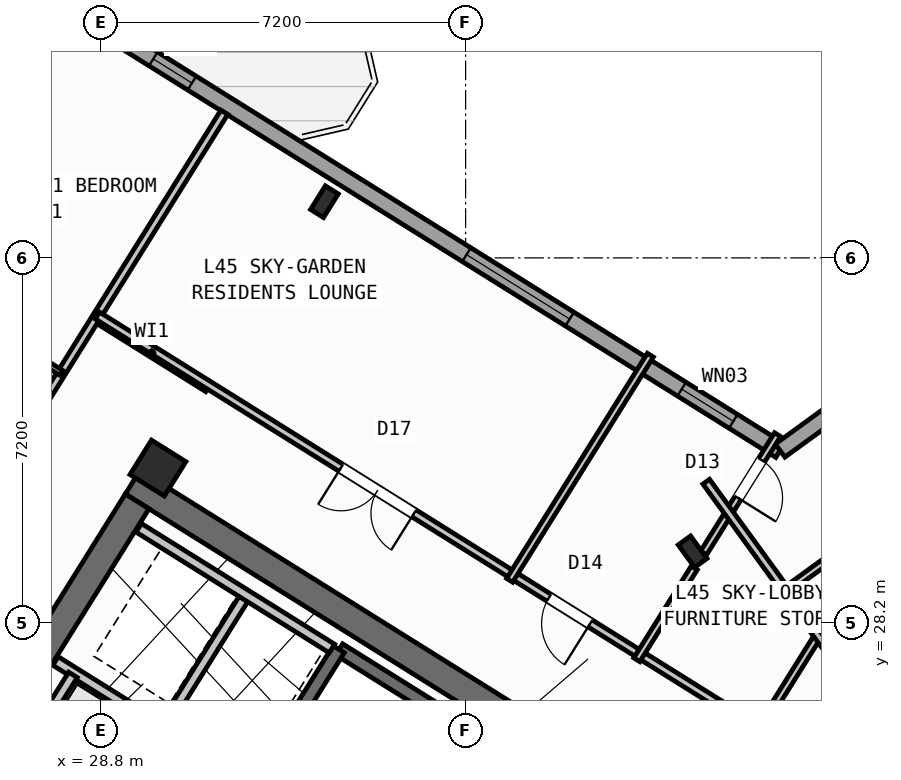
"""IFC4 building model, lengths in metres.
Left out: names, types, materials, properties, quantities, classifications, styles, units other than length and angle.
Written with IfcOpenShell. Run it as: python <this file> out.ifc"""

import sys

from ifc_helpers import new_model, si_unit, direction, frame, frame_2d, origin, origin_2d, place, context, subcontext, project, spatial, rectangle, hollow_rectangle, i_section, extrude, source, transform, mapped, element, fill, save


model = new_model("IFC4")
c1 = context("Model", 3, precision=1e-05, world=origin(), true_north=direction((0.0, 1.0)))
c2 = subcontext(c1, "Body", "Model", "MODEL_VIEW")
j1 = project(units=[si_unit("LENGTHUNIT", "METRE"), si_unit("PLANEANGLEUNIT", "RADIAN")], contexts=[c1])
p1 = place(None, origin())
s1 = spatial("IfcSite", under=j1, at=p1, CompositionType="ELEMENT")
p2 = place(p1, origin())
s2 = spatial("IfcBuilding", under=s1, at=p2, CompositionType="ELEMENT")
p3 = place(p2, frame((0.0, 0.0, 179.4)))
s3 = spatial("IfcBuildingStorey", under=s2, at=p3, CompositionType="ELEMENT", Elevation=179.4)
p4 = place(p3, frame((40.573, 24.01, 0.0), z_axis=(0.0, 0.0, 1.0), x_axis=(-0.848047359947, 0.529920442413, 0.0)))
e1 = element("IfcWall", 1, at=p4, inside=s3, PredefinedType="SHEAR", context=c2, shape_type="SweptSolid", body=[
    extrude(rectangle(XDim=13.14, YDim=0.55, at=frame_2d((6.57, 0.0))), origin(), (0.0, 0.0, 1.0), 4.55),
])
p5 = place(p3, frame((29.517, 30.594, 0.0), z_axis=(0.0, 0.0, 1.0), x_axis=(-0.529906864564, -0.848055844204, 0.0)))
e2 = element("IfcWall", 2, at=p5, inside=s3, PredefinedType="SHEAR", context=c2, shape_type="SweptSolid", body=[
    extrude(rectangle(XDim=3.575, YDim=0.55, at=frame_2d((1.788, 0.0))), origin(), (0.0, 0.0, 1.0), 4.55),
])
m1 = source(origin(), c2, "Body", "SweptSolid", [
    extrude(i_section(OverallWidth=0.3, OverallDepth=0.55, WebThickness=0.015, FlangeThickness=0.029, at=origin_2d()), origin(), (0.0, 0.0, 1.0), 4.8),
])
p6 = place(p3, frame((33.213, 36.509, 0.0), z_axis=(0.0, 0.0, 1.0), x_axis=(-0.848048096156, 0.529919264233, 0.0)))
e3 = element("IfcColumn", 3, at=p6, inside=s3, PredefinedType="COLUMN", context=c2, shape_type="MappedRepresentation", body=[
    mapped(m1, transform((0.0, 0.0, 0.0), scale=1.0)),
])
m2 = source(origin(), c2, "Body", "SweptSolid", [
    extrude(hollow_rectangle(XDim=0.8, YDim=0.8, WallThickness=0.032, at=origin_2d()), origin(), (0.0, 0.0, 1.0), 4.8),
])
p7 = place(p3, frame((29.928, 31.251, 0.0), z_axis=(0.0, 0.0, 1.0), x_axis=(-0.848048096156, 0.529919264233, 0.0)))
e4 = element("IfcColumn", 4, at=p7, inside=s3, PredefinedType="COLUMN", context=c2, shape_type="MappedRepresentation", body=[
    mapped(m2, transform((0.0, 0.0, 0.0), scale=1.0)),
])
p8 = place(p3, frame((40.479, 29.601, 0.0), z_axis=(0.0, 0.0, 1.0), x_axis=(0.809016994375, 0.587785252292, 0.0)))
e5 = element("IfcColumn", 5, at=p8, inside=s3, PredefinedType="COLUMN", context=c2, shape_type="MappedRepresentation", body=[
    mapped(m1, transform((0.0, 0.0, 0.0), scale=1.0)),
])
p9 = place(p3, frame((31.76, 12.183, 0.0), z_axis=(0.0, 0.0, 1.0), x_axis=(-0.848047074256, 0.529920899612, 0.0)))
e6 = element("IfcWall", 6, at=p9, inside=s3, PredefinedType="STANDARD", context=c2, shape_type="SweptSolid", body=[
    extrude(rectangle(XDim=30.652, YDim=0.32, at=frame_2d((15.326, 0.0))), origin(), (0.0, 0.0, 1.0), 4.55),
])
p10 = place(p9, frame((21.52, 0.0, 0.0)))
e7 = element("IfcOpeningElement", 7, at=p10, cuts=e6, PredefinedType="OPENING", context=c2, shape_type="SweptSolid", body=[
    extrude(rectangle(XDim=1.2, YDim=2.15, at=frame_2d((0.6, 1.075))), frame((0.0, 0.17, 0.0), z_axis=(0.0, -1.0, 0.0), x_axis=(1.0, 0.0, 0.0)), (0.0, 0.0, 1.0), 0.34),
])
p11 = place(p9, frame((14.878, 0.0, 0.0)))
e8 = element("IfcOpeningElement", 8, at=p11, cuts=e6, PredefinedType="OPENING", context=c2, shape_type="SweptSolid", body=[
    extrude(rectangle(XDim=1.5, YDim=2.25, at=frame_2d((0.75, 1.125))), frame((0.0, 0.17, 0.0), z_axis=(0.0, -1.0, 0.0), x_axis=(1.0, 0.0, 0.0)), (0.0, 0.0, 1.0), 0.34),
])
p12 = place(p9, frame((1.865, 0.0, 0.75)))
e9 = element("IfcOpeningElement", 9, at=p12, cuts=e6, PredefinedType="OPENING", context=c2, shape_type="SweptSolid", body=[
    extrude(rectangle(XDim=2.4, YDim=1.6, at=frame_2d((1.2, 0.8))), frame((0.0, 0.17, 0.0), z_axis=(0.0, -1.0, 0.0), x_axis=(1.0, 0.0, 0.0)), (0.0, 0.0, 1.0), 0.34),
])
p13 = place(p9, frame((7.094, 0.0, 0.75)))
e10 = element("IfcOpeningElement", 10, at=p13, cuts=e6, PredefinedType="OPENING", context=c2, shape_type="SweptSolid", body=[
    extrude(rectangle(XDim=2.4, YDim=1.6, at=frame_2d((1.2, 0.8))), frame((0.0, 0.17, 0.0), z_axis=(0.0, -1.0, 0.0), x_axis=(1.0, 0.0, 0.0)), (0.0, 0.0, 1.0), 0.34),
])
p14 = place(p9, frame((19.404, 0.0, 0.95)))
e11 = element("IfcOpeningElement", 11, at=p14, cuts=e6, PredefinedType="OPENING", context=c2, shape_type="SweptSolid", body=[
    extrude(rectangle(XDim=1.2, YDim=1.4, at=frame_2d((0.6, 0.7))), frame((0.0, 0.17, 0.0), z_axis=(0.0, -1.0, 0.0), x_axis=(1.0, 0.0, 0.0)), (0.0, 0.0, 1.0), 0.34),
])
p15 = place(p9, frame((26.458, 0.0, 0.75)))
e12 = element("IfcOpeningElement", 12, at=p15, cuts=e6, PredefinedType="OPENING", context=c2, shape_type="SweptSolid", body=[
    extrude(rectangle(XDim=2.4, YDim=1.6, at=frame_2d((1.2, 0.8))), frame((0.0, 0.17, 0.0), z_axis=(0.0, -1.0, 0.0), x_axis=(1.0, 0.0, 0.0)), (0.0, 0.0, 1.0), 0.34),
])
p16 = place(p3, frame((17.424, 47.083, 0.0), z_axis=(0.0, 0.0, 1.0), x_axis=(0.848049927979, -0.529916332693, 0.0)))
e13 = element("IfcWall", 13, at=p16, inside=s3, PredefinedType="STANDARD", context=c2, shape_type="SweptSolid", body=[
    extrude(rectangle(XDim=29.223, YDim=0.32, at=frame_2d((14.612, 0.0))), origin(), (0.0, 0.0, 1.0), 4.55),
])
p17 = place(p16, frame((2.745, 0.0, 0.0)))
e14 = element("IfcOpeningElement", 14, at=p17, cuts=e13, PredefinedType="OPENING", context=c2, shape_type="SweptSolid", body=[
    extrude(rectangle(XDim=1.05, YDim=2.15, at=frame_2d((0.525, 1.075))), frame((0.0, 0.17, 0.0), z_axis=(0.0, -1.0, 0.0), x_axis=(1.0, 0.0, 0.0)), (0.0, 0.0, 1.0), 0.34),
])
p18 = place(p16, frame((21.926, 0.0, 0.75)))
e15 = element("IfcOpeningElement", 15, at=p18, cuts=e13, PredefinedType="OPENING", context=c2, shape_type="SweptSolid", body=[
    extrude(rectangle(XDim=2.4, YDim=1.6, at=frame_2d((1.2, 0.8))), frame((0.0, 0.17, 0.0), z_axis=(0.0, -1.0, 0.0), x_axis=(1.0, 0.0, 0.0)), (0.0, 0.0, 1.0), 0.34),
])
p19 = place(p16, frame((26.934, 0.0, 0.95)))
e16 = element("IfcOpeningElement", 16, at=p19, cuts=e13, PredefinedType="OPENING", context=c2, shape_type="SweptSolid", body=[
    extrude(rectangle(XDim=1.2, YDim=1.4, at=frame_2d((0.6, 0.7))), frame((0.0, 0.17, 0.0), z_axis=(0.0, -1.0, 0.0), x_axis=(1.0, 0.0, 0.0)), (0.0, 0.0, 1.0), 0.34),
])
p20 = place(p16, frame((10.057, 0.0, 1.0)))
e17 = element("IfcOpeningElement", 17, at=p20, cuts=e13, PredefinedType="OPENING", context=c2, shape_type="SweptSolid", body=[
    extrude(rectangle(XDim=0.65, YDim=1.15, at=frame_2d((0.325, 0.575))), frame((0.0, 0.17, 0.0), z_axis=(0.0, -1.0, 0.0), x_axis=(1.0, 0.0, 0.0)), (0.0, 0.0, 1.0), 0.34),
])
p21 = place(p16, frame((14.636, 0.0, 1.0)))
e18 = element("IfcOpeningElement", 18, at=p21, cuts=e13, PredefinedType="OPENING", context=c2, shape_type="SweptSolid", body=[
    extrude(rectangle(XDim=0.9, YDim=1.25, at=frame_2d((0.45, 0.625))), frame((0.0, 0.17, 0.0), z_axis=(0.0, -1.0, 0.0), x_axis=(1.0, 0.0, 0.0)), (0.0, 0.0, 1.0), 0.34),
])
p22 = place(p16, frame((8.052, 0.0, 1.0)))
e19 = element("IfcOpeningElement", 19, at=p22, cuts=e13, PredefinedType="OPENING", context=c2, shape_type="SweptSolid", body=[
    extrude(rectangle(XDim=0.65, YDim=1.15, at=frame_2d((0.325, 0.575))), frame((0.0, 0.17, 0.0), z_axis=(0.0, -1.0, 0.0), x_axis=(1.0, 0.0, 0.0)), (0.0, 0.0, 1.0), 0.34),
])
p23 = place(p3, frame((42.207, 31.597, 0.0), z_axis=(0.0, 0.0, 1.0), x_axis=(0.809020333377, 0.587780656523, 0.0)))
e20 = element("IfcWall", 20, at=p23, inside=s3, PredefinedType="STANDARD", context=c2, shape_type="SweptSolid", body=[
    extrude(rectangle(XDim=15.223, YDim=0.32, at=frame_2d((7.611, 0.0))), origin(), (0.0, 0.0, 1.0), 4.55),
])
p24 = place(p23, frame((12.562, 0.0, 0.0)))
e21 = element("IfcOpeningElement", 21, at=p24, cuts=e20, PredefinedType="OPENING", context=c2, shape_type="SweptSolid", body=[
    extrude(rectangle(XDim=1.05, YDim=2.15, at=frame_2d((0.525, 1.075))), frame((0.0, 0.17, 0.0), z_axis=(0.0, -1.0, 0.0), x_axis=(1.0, 0.0, 0.0)), (0.0, 0.0, 1.0), 0.34),
])
p25 = place(p23, frame((2.97, 0.0, 0.75)))
e22 = element("IfcOpeningElement", 22, at=p25, cuts=e20, PredefinedType="OPENING", context=c2, shape_type="SweptSolid", body=[
    extrude(rectangle(XDim=2.4, YDim=1.6, at=frame_2d((1.2, 0.8))), frame((0.0, 0.17, 0.0), z_axis=(0.0, -1.0, 0.0), x_axis=(1.0, 0.0, 0.0)), (0.0, 0.0, 1.0), 0.34),
])
p26 = place(p3, frame((39.721, 23.788, 0.0), z_axis=(0.0, 0.0, 1.0), x_axis=(-0.848054434086, 0.529909121291, 0.0)))
e23 = element("IfcWall", 23, at=p26, inside=s3, PredefinedType="SHEAR", context=c2, shape_type="SweptSolid", body=[
    extrude(rectangle(XDim=7.33, YDim=0.26, at=frame_2d((3.665, 0.0))), origin(), (0.0, 0.0, 1.0), 4.55),
])
p27 = place(p3, frame((33.496, 27.677, 0.0), z_axis=(0.0, 0.0, 1.0), x_axis=(-0.529908658664, -0.84805472316, 0.0)))
e24 = element("IfcWall", 24, at=p27, inside=s3, PredefinedType="SHEAR", context=c2, shape_type="SweptSolid", body=[
    extrude(rectangle(XDim=3.16, YDim=0.26, at=frame_2d((1.58, 0.0))), origin(), (0.0, 0.0, 1.0), 4.55),
])
p28 = place(p3, frame((31.822, 24.998, 0.0), z_axis=(0.0, 0.0, 1.0), x_axis=(-0.848036912365, 0.52993716162, 0.0)))
e25 = element("IfcWall", 25, at=p28, inside=s3, PredefinedType="STANDARD", context=c2, shape_type="SweptSolid", body=[
    extrude(rectangle(XDim=4.618, YDim=0.2, at=frame_2d((2.309, 0.0))), origin(), (0.0, 0.0, 1.0), 4.54),
])
p29 = place(p3, frame((28.25, 27.17, 0.0), z_axis=(0.0, 0.0, 1.0), x_axis=(-0.529905827651, -0.848056492117, 0.0)))
e26 = element("IfcWall", 26, at=p29, inside=s3, PredefinedType="STANDARD", context=c2, shape_type="SweptSolid", body=[
    extrude(rectangle(XDim=1.65, YDim=0.2, at=frame_2d((0.825, 0.0))), origin(), (0.0, 0.0, 1.0), 4.54),
])
p30 = place(p3, frame((31.645, 28.716, 0.0), z_axis=(0.0, 0.0, 1.0), x_axis=(-0.52986693015, -0.848080795876, 0.0)))
e27 = element("IfcWall", 27, at=p30, inside=s3, PredefinedType="STANDARD", context=c2, shape_type="SweptSolid", body=[
    extrude(rectangle(XDim=2.66, YDim=0.2, at=frame_2d((1.33, 0.0))), origin(), (0.0, 0.0, 1.0), 4.54),
])
p31 = place(p3, frame((33.363, 27.69, 0.0), z_axis=(0.0, 0.0, 1.0), x_axis=(-0.848047090064, 0.529920874315, 0.0)))
e28 = element("IfcWall", 28, at=p31, inside=s3, PredefinedType="STANDARD", context=c2, shape_type="SweptSolid", body=[
    extrude(rectangle(XDim=4.498, YDim=0.2, at=frame_2d((2.249, 0.0))), origin(), (0.0, 0.0, 1.0), 4.54),
])
p32 = place(p3, frame((30.914, 32.829, 0.0), z_axis=(0.0, 0.0, 1.0), x_axis=(-0.848008813643, 0.529982124211, 0.0)))
e29 = element("IfcWall", 29, at=p32, inside=s3, PredefinedType="PARTITIONING", context=c2, shape_type="SweptSolid", body=[
    extrude(rectangle(XDim=2.61, YDim=0.16, at=frame_2d((1.305, 0.0))), origin(), (0.0, 0.0, 1.0), 4.54),
])
p33 = place(p3, frame((31.239, 38.274, 0.0), z_axis=(0.0, 0.0, 1.0), x_axis=(-0.529921796515, -0.848046513806, 0.0)))
e30 = element("IfcWall", 30, at=p33, inside=s3, PredefinedType="PARTITIONING", context=c2, shape_type="SweptSolid", body=[
    extrude(rectangle(XDim=16.5, YDim=0.16, at=frame_2d((8.25, 0.0))), origin(), (0.0, 0.0, 1.0), 4.54),
])
p34 = place(p3, frame((27.889, 40.685, 0.0), z_axis=(0.0, 0.0, 1.0), x_axis=(-0.529924752708, -0.848044666552, 0.0)))
e31 = element("IfcWall", 31, at=p34, inside=s3, PredefinedType="PARTITIONING", context=c2, shape_type="SweptSolid", body=[
    extrude(rectangle(XDim=6.508, YDim=0.11, at=frame_2d((3.254, 0.0))), origin(), (0.0, 0.0, 1.0), 4.54),
])
p35 = place(p3, frame((28.023, 33.129, 0.0), z_axis=(0.0, 0.0, 1.0), x_axis=(-0.848051592054, 0.529913669587, 0.0)))
e32 = element("IfcWall", 32, at=p35, inside=s3, PredefinedType="PARTITIONING", context=c2, shape_type="SweptSolid", body=[
    extrude(rectangle(XDim=4.118, YDim=0.11, at=frame_2d((2.059, 0.0))), origin(), (0.0, 0.0, 1.0), 4.54),
])
p36 = place(p35, frame((1.599, 0.0, 0.0)))
e33 = element("IfcOpeningElement", 33, at=p36, cuts=e32, PredefinedType="OPENING", context=c2, shape_type="SweptSolid", body=[
    extrude(rectangle(XDim=0.92, YDim=2.08, at=frame_2d((0.46, 1.04))), frame((0.0, 0.065, 0.0), z_axis=(0.0, -1.0, 0.0), x_axis=(1.0, 0.0, 0.0)), (0.0, 0.0, 1.0), 0.13),
])
p37 = place(p3, frame((41.936, 26.012, 0.0), z_axis=(0.0, 0.0, 1.0), x_axis=(-0.848051154596, 0.529914369676, 0.0)))
e34 = element("IfcWall", 34, at=p37, inside=s3, PredefinedType="PARTITIONING", context=c2, shape_type="SweptSolid", body=[
    extrude(rectangle(XDim=15.57, YDim=0.16, at=frame_2d((7.785, 0.0))), origin(), (0.0, 0.0, 1.0), 4.54),
])
p38 = place(p37, frame((4.1, 0.0, 0.0)))
e35 = element("IfcOpeningElement", 35, at=p38, cuts=e34, PredefinedType="OPENING", context=c2, shape_type="SweptSolid", body=[
    extrude(rectangle(XDim=0.96, YDim=2.08, at=frame_2d((0.48, 1.04))), frame((0.0, 0.09, 0.0), z_axis=(0.0, -1.0, 0.0), x_axis=(1.0, 0.0, 0.0)), (0.0, 0.0, 1.0), 0.18),
])
p39 = place(p37, frame((8.2, 0.0, 0.0)))
e36 = element("IfcOpeningElement", 36, at=p39, cuts=e34, PredefinedType="OPENING", context=c2, shape_type="SweptSolid", body=[
    extrude(rectangle(XDim=1.7, YDim=2.2, at=frame_2d((0.85, 1.1))), frame((0.0, 0.09, 0.0), z_axis=(0.0, -1.0, 0.0), x_axis=(1.0, 0.0, 0.0)), (0.0, 0.0, 1.0), 0.18),
])
p40 = place(p3, frame((42.156, 31.912, 0.0), z_axis=(0.0, 0.0, 1.0), x_axis=(-0.529943141103, -0.848033175765, 0.0)))
e37 = element("IfcWall", 37, at=p40, inside=s3, PredefinedType="PLUMBINGWALL", context=c2, shape_type="SweptSolid", body=[
    extrude(rectangle(XDim=2.753, YDim=0.14, at=frame_2d((1.376, 0.0))), origin(), (0.0, 0.0, 1.0), 4.135),
])
p41 = place(p40, frame((0.593, 0.0, 0.0)))
e38 = element("IfcOpeningElement", 38, at=p41, cuts=e37, PredefinedType="OPENING", context=c2, shape_type="SweptSolid", body=[
    extrude(rectangle(XDim=0.88, YDim=2.08, at=frame_2d((0.44, 1.04))), frame((0.0, 0.08, 0.0), z_axis=(0.0, -1.0, 0.0), x_axis=(1.0, 0.0, 0.0)), (0.0, 0.0, 1.0), 0.16),
])
p42 = place(p3, frame((40.512, 29.281, 0.0), z_axis=(0.0, 0.0, 1.0), x_axis=(-0.529947607416, -0.848030384712, 0.0)))
e39 = element("IfcWall", 39, at=p42, inside=s3, PredefinedType="PLUMBINGWALL", context=c2, shape_type="SweptSolid", body=[
    extrude(rectangle(XDim=2.138, YDim=0.14, at=frame_2d((1.069, 0.0))), origin(), (0.0, 0.0, 1.0), 4.54),
])
p43 = place(p3, frame((43.916, 29.483, 0.0), z_axis=(0.0, 0.0, 1.0), x_axis=(-0.529897559092, -0.848061658648, 0.0)))
e40 = element("IfcWall", 40, at=p43, inside=s3, PredefinedType="PLUMBINGWALL", context=c2, shape_type="SweptSolid", body=[
    extrude(rectangle(XDim=4.113, YDim=0.14, at=frame_2d((2.057, 0.0))), origin(), (0.0, 0.0, 1.0), 4.025),
])
p44 = place(p3, frame((39.646, 33.48, 0.0), z_axis=(0.0, 0.0, 1.0), x_axis=(-0.529923555071, -0.848045414928, 0.0)))
e41 = element("IfcWall", 41, at=p44, inside=s3, PredefinedType="PLUMBINGWALL", context=c2, shape_type="SweptSolid", body=[
    extrude(rectangle(XDim=5.24, YDim=0.14, at=frame_2d((2.62, 0.0))), origin(), (0.0, 0.0, 1.0), 4.54),
])
p45 = place(p3, frame((42.866, 26.044, 0.0), z_axis=(0.0, 0.0, 1.0), x_axis=(0.809020254154, 0.587780765566, 0.0)))
e42 = element("IfcWall", 42, at=p45, inside=s3, PredefinedType="PARTITIONING", context=c2, shape_type="SweptSolid", body=[
    extrude(rectangle(XDim=14.67, YDim=0.16, at=frame_2d((7.335, 0.0))), origin(), (0.0, 0.0, 1.0), 4.54),
])
p46 = place(p45, frame((10.08, 0.0, 0.0)))
e43 = element("IfcOpeningElement", 43, at=p46, cuts=e42, PredefinedType="OPENING", context=c2, shape_type="SweptSolid", body=[
    extrude(rectangle(XDim=1.0, YDim=2.1, at=frame_2d((0.5, 1.05))), frame((0.0, 0.09, 0.0), z_axis=(0.0, -1.0, 0.0), x_axis=(1.0, 0.0, 0.0)), (0.0, 0.0, 1.0), 0.18),
])
p47 = place(p3, frame((43.969, 26.55, 0.0), z_axis=(0.0, 0.0, 1.0), x_axis=(-0.587776919386, 0.80902304852, 0.0)))
e44 = element("IfcWall", 44, at=p47, inside=s3, PredefinedType="PARTITIONING", context=c2, shape_type="SweptSolid", body=[
    extrude(rectangle(XDim=5.48, YDim=0.16, at=frame_2d((2.74, 0.0))), origin(), (0.0, 0.0, 1.0), 4.54),
])
p48 = place(p3, frame((42.377, 28.878, 0.0), z_axis=(0.0, 0.0, 1.0), x_axis=(0.809020411523, 0.587780548963, 0.0)))
e45 = element("IfcWall", 45, at=p48, inside=s3, PredefinedType="PLUMBINGWALL", context=c2, shape_type="SweptSolid", body=[
    extrude(rectangle(XDim=13.4, YDim=0.14, at=frame_2d((6.7, 0.0))), origin(), (0.0, 0.0, 1.0), 4.54),
])
p49 = place(p48, frame((8.82, 0.0, 0.0)))
e46 = element("IfcOpeningElement", 46, at=p49, cuts=e45, PredefinedType="OPENING", context=c2, shape_type="SweptSolid", body=[
    extrude(rectangle(XDim=0.92, YDim=2.08, at=frame_2d((0.46, 1.04))), frame((0.0, 0.08, 0.0), z_axis=(0.0, -1.0, 0.0), x_axis=(1.0, 0.0, 0.0)), (0.0, 0.0, 1.0), 0.16),
])
m3 = source(origin(), c2, "Body", "SweptSolid", [
    extrude(rectangle(XDim=2.4, YDim=1.6, at=frame_2d((1.2, 0.8))), frame((0.0, 0.03, 0.0), z_axis=(0.0, -1.0, 0.0), x_axis=(1.0, 0.0, 0.0)), (0.0, 0.0, 1.0), 0.06),
])
p50 = place(p18, origin())
e47 = element("IfcWindow", 47, at=p50, inside=s3, PartitioningType="SINGLE_PANEL", PredefinedType="WINDOW", context=c2, shape_type="MappedRepresentation", body=[
    mapped(m3, transform((0.0, 0.0, 0.0), scale=1.0)),
])
fill(e15, e47)
m4 = source(origin(), c2, "Body", "SweptSolid", [
    extrude(rectangle(XDim=1.2, YDim=1.4, at=frame_2d((0.6, 0.7))), frame((0.0, 0.03, 0.0), z_axis=(0.0, -1.0, 0.0), x_axis=(1.0, 0.0, 0.0)), (0.0, 0.0, 1.0), 0.06),
])
p51 = place(p19, origin())
e48 = element("IfcWindow", 48, at=p51, inside=s3, PartitioningType="SINGLE_PANEL", PredefinedType="WINDOW", context=c2, shape_type="MappedRepresentation", body=[
    mapped(m4, transform((0.0, 0.0, 0.0), scale=1.0)),
])
fill(e16, e48)
m5 = source(origin(), c2, "Body", "SweptSolid", [
    extrude(rectangle(XDim=0.9, YDim=1.25, at=frame_2d((0.45, 0.625))), frame((0.0, 0.03, 0.0), z_axis=(0.0, -1.0, 0.0), x_axis=(1.0, 0.0, 0.0)), (0.0, 0.0, 1.0), 0.06),
])
p52 = place(p21, origin())
e49 = element("IfcWindow", 49, at=p52, inside=s3, PartitioningType="SINGLE_PANEL", PredefinedType="WINDOW", context=c2, shape_type="MappedRepresentation", body=[
    mapped(m5, transform((0.0, 0.0, 0.0), scale=1.0)),
])
fill(e18, e49)
m6 = source(origin(), c2, "Body", "SweptSolid", [
    extrude(rectangle(XDim=0.88, YDim=2.08, at=frame_2d((0.44, 1.04))), frame((0.0, 0.025, 0.0), z_axis=(0.0, -1.0, 0.0), x_axis=(1.0, 0.0, 0.0)), (0.0, 0.0, 1.0), 0.05),
])
p53 = place(p41, origin())
e50 = element("IfcDoor", 50, at=p53, inside=s3, OperationType="SINGLE_SWING_RIGHT", PredefinedType="DOOR", context=c2, shape_type="MappedRepresentation", body=[
    mapped(m6, transform((0.0, 0.0, 0.0), scale=1.0)),
])
fill(e38, e50)
m7 = source(origin(), c2, "Body", "SweptSolid", [
    extrude(rectangle(XDim=0.96, YDim=2.08, at=frame_2d((0.48, 1.04))), frame((0.0, 0.025, 0.0), z_axis=(0.0, -1.0, 0.0), x_axis=(1.0, 0.0, 0.0)), (0.0, 0.0, 1.0), 0.05),
])
p54 = place(p38, origin())
e51 = element("IfcDoor", 51, at=p54, inside=s3, OperationType="SINGLE_SWING_LEFT", PredefinedType="DOOR", context=c2, shape_type="MappedRepresentation", body=[
    mapped(m7, transform((0.0, 0.0, 0.0), scale=1.0)),
])
fill(e35, e51)
m8 = source(origin(), c2, "Body", "SweptSolid", [
    extrude(rectangle(XDim=1.7, YDim=2.2, at=frame_2d((0.85, 1.1))), frame((0.0, 0.025, 0.0), z_axis=(0.0, -1.0, 0.0), x_axis=(1.0, 0.0, 0.0)), (0.0, 0.0, 1.0), 0.05),
])
p55 = place(p39, origin())
e52 = element("IfcDoor", 52, at=p55, inside=s3, OperationType="DOUBLE_DOOR_SINGLE_SWING", PredefinedType="DOOR", context=c2, shape_type="MappedRepresentation", body=[
    mapped(m8, transform((0.0, 0.0, 0.0), scale=1.0)),
])
fill(e36, e52)
save(model, sys.argv[1])
